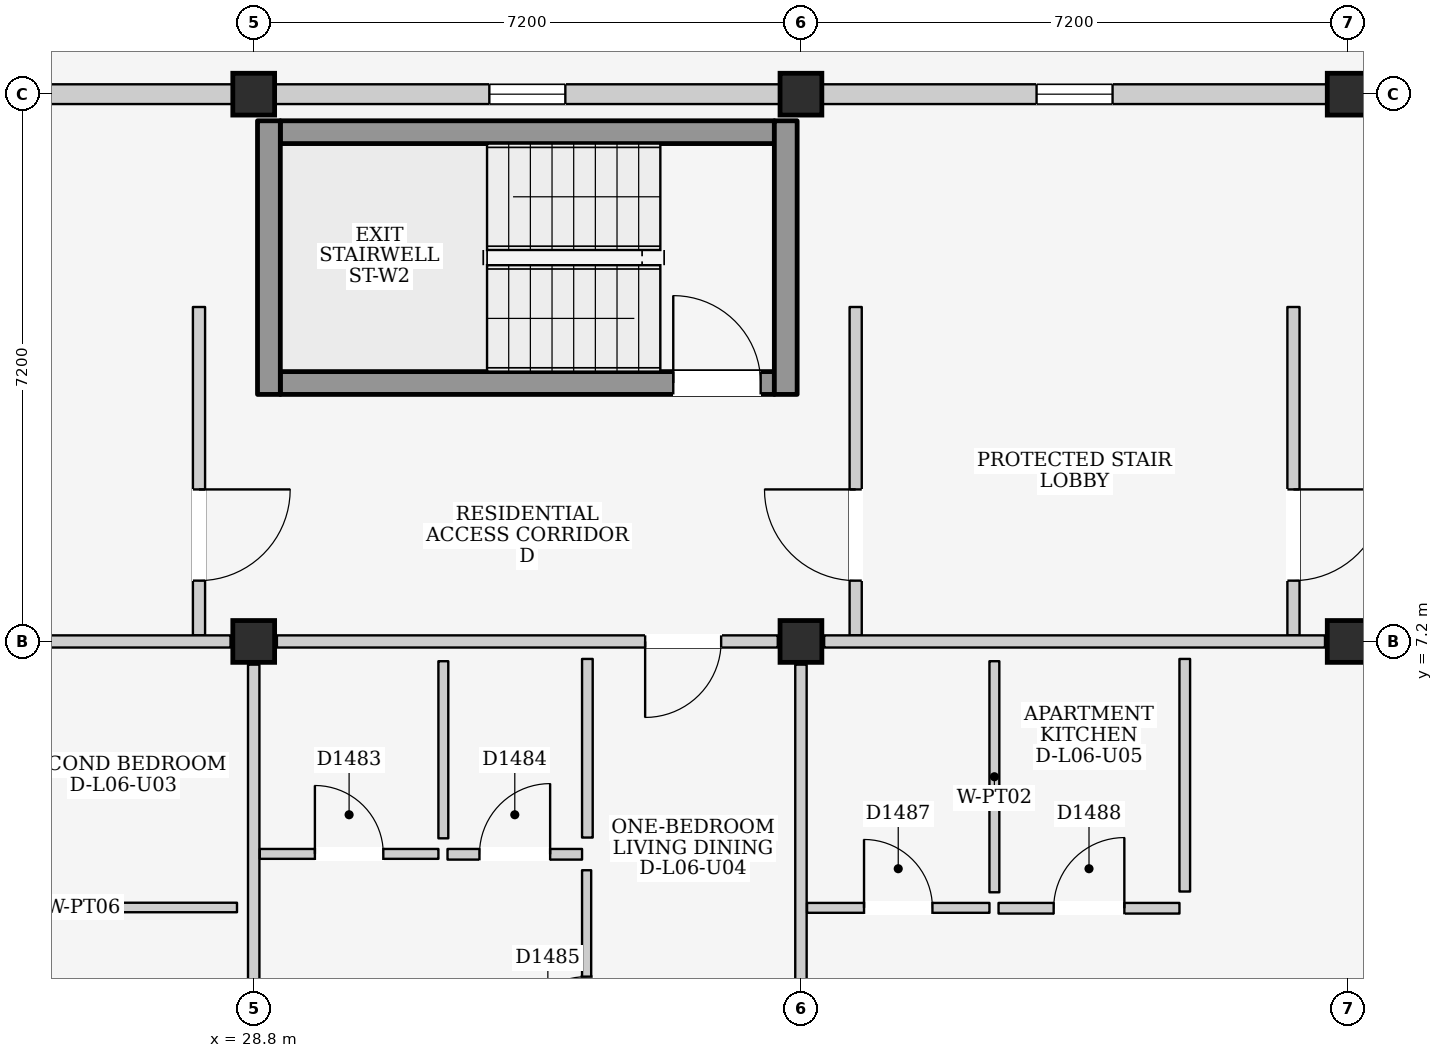
"""IFC4 building model, lengths in metres.
Left out: names, types, materials, properties, quantities, classifications, styles, units other than length and angle.
Written with IfcOpenShell. Run it as: python <this file> out.ifc"""

import sys

from ifc_helpers import new_model, si_unit, direction, frame, frame_2d, origin, origin_2d, place, context, subcontext, project, spatial, rectangle, extrude, element, fill, save


model = new_model("IFC4")
c1 = context("Model", 3, precision=1e-05, world=origin(), true_north=direction((0.0, 1.0)))
c2 = subcontext(c1, "Body", "Model", "MODEL_VIEW")
j1 = project(units=[si_unit("LENGTHUNIT", "METRE"), si_unit("PLANEANGLEUNIT", "RADIAN")], contexts=[c1])
p1 = place(None, origin())
s1 = spatial("IfcSite", under=j1, at=p1, CompositionType="ELEMENT")
p2 = place(p1, origin())
s2 = spatial("IfcBuilding", under=s1, at=p2, CompositionType="ELEMENT")
p3 = place(p2, frame((0.0, 0.0, 21.9)))
s3 = spatial("IfcBuildingStorey", under=s2, at=p3, CompositionType="ELEMENT", Elevation=21.9)
for number, where, z_axis, x_axis in (
    (1, (28.8, 7.2, 0.0), (0.0, 0.0, 1.0), (1.0, 0.0, 0.0)),
    (2, (28.8, 14.4, 0.0), (0.0, 0.0, 1.0), (1.0, 0.0, 0.0)),
    (3, (36.0, 7.2, 0.0), (0.0, 0.0, 1.0), (1.0, 0.0, 0.0)),
    (4, (36.0, 14.4, 0.0), (0.0, 0.0, 1.0), (1.0, 0.0, 0.0)),
    (5, (43.2, 7.2, 0.0), (0.0, 0.0, 1.0), (1.0, 0.0, 0.0)),
    (6, (43.2, 14.4, 0.0), (0.0, 0.0, 1.0), (1.0, 0.0, 0.0)),
):
    element("IfcColumn", number, at=place(p3, frame(where, z_axis=z_axis, x_axis=x_axis)), inside=s3, PredefinedType="COLUMN", context=c2, shape_type="SweptSolid", body=[
        extrude(rectangle(XDim=0.55, YDim=0.55, at=origin_2d()), origin(), (0.0, 0.0, 1.0), 3.2),
    ])
p4 = place(p3, frame((21.875, 14.4, 0.0), z_axis=(0.0, 0.0, 1.0), x_axis=(1.0, 0.0, 0.0)))
e7 = element("IfcWall", 7, at=p4, inside=s3, PredefinedType="ELEMENTEDWALL", context=c2, shape_type="SweptSolid", body=[
    extrude(rectangle(XDim=6.65, YDim=0.26, at=frame_2d((3.325, 0.0))), origin(), (0.0, 0.0, 1.0), 2.365),
])
p5 = place(p4, frame((2.825, 0.0, 1.2)))
e8 = element("IfcOpeningElement", 8, at=p5, cuts=e7, PredefinedType="OPENING", context=c2, shape_type="SweptSolid", body=[
    extrude(rectangle(XDim=1.0, YDim=0.9, at=frame_2d((0.5, 0.45))), frame((0.0, 0.145, 0.0), z_axis=(0.0, -1.0, 0.0), x_axis=(1.0, 0.0, 0.0)), (0.0, 0.0, 1.0), 0.29),
])
p6 = place(p3, frame((29.075, 14.4, 0.0), z_axis=(0.0, 0.0, 1.0), x_axis=(1.0, 0.0, 0.0)))
e9 = element("IfcWall", 9, at=p6, inside=s3, PredefinedType="ELEMENTEDWALL", context=c2, shape_type="SweptSolid", body=[
    extrude(rectangle(XDim=6.65, YDim=0.26, at=frame_2d((3.325, 0.0))), origin(), (0.0, 0.0, 1.0), 2.365),
])
p7 = place(p6, frame((2.825, 0.0, 1.2)))
e10 = element("IfcOpeningElement", 10, at=p7, cuts=e9, PredefinedType="OPENING", context=c2, shape_type="SweptSolid", body=[
    extrude(rectangle(XDim=1.0, YDim=0.9, at=frame_2d((0.5, 0.45))), frame((0.0, 0.145, 0.0), z_axis=(0.0, -1.0, 0.0), x_axis=(1.0, 0.0, 0.0)), (0.0, 0.0, 1.0), 0.29),
])
p8 = place(p3, frame((36.275, 14.4, 0.0), z_axis=(0.0, 0.0, 1.0), x_axis=(1.0, 0.0, 0.0)))
e11 = element("IfcWall", 11, at=p8, inside=s3, PredefinedType="ELEMENTEDWALL", context=c2, shape_type="SweptSolid", body=[
    extrude(rectangle(XDim=6.65, YDim=0.26, at=frame_2d((3.325, 0.0))), origin(), (0.0, 0.0, 1.0), 2.365),
])
p9 = place(p8, frame((2.825, 0.0, 1.2)))
e12 = element("IfcOpeningElement", 12, at=p9, cuts=e11, PredefinedType="OPENING", context=c2, shape_type="SweptSolid", body=[
    extrude(rectangle(XDim=1.0, YDim=0.9, at=frame_2d((0.5, 0.45))), frame((0.0, 0.145, 0.0), z_axis=(0.0, -1.0, 0.0), x_axis=(1.0, 0.0, 0.0)), (0.0, 0.0, 1.0), 0.29),
])
p10 = place(p3, frame((28.08, 7.28, 0.0), z_axis=(0.0, 0.0, 1.0), x_axis=(0.0, 1.0, 0.0)))
e13 = element("IfcWall", 13, at=p10, inside=s3, PredefinedType="PARTITIONING", context=c2, shape_type="SweptSolid", body=[
    extrude(rectangle(XDim=4.32, YDim=0.16, at=frame_2d((2.16, 0.0))), origin(), (0.0, 0.0, 1.0), 2.98),
])
p11 = place(p10, frame((0.72, 0.0, 0.0)))
e14 = element("IfcOpeningElement", 14, at=p11, cuts=e13, PredefinedType="OPENING", context=c2, shape_type="SweptSolid", body=[
    extrude(rectangle(XDim=1.2, YDim=2.2, at=frame_2d((0.6, 1.1))), frame((0.0, 0.095, 0.0), z_axis=(0.0, -1.0, 0.0), x_axis=(1.0, 0.0, 0.0)), (0.0, 0.0, 1.0), 0.19),
])
p12 = place(p3, frame((29.15, 10.6, 0.0), z_axis=(0.0, 0.0, 1.0), x_axis=(1.0, 0.0, 0.0)))
e15 = element("IfcWall", 15, at=p12, inside=s3, PredefinedType="SHEAR", context=c2, shape_type="SweptSolid", body=[
    extrude(rectangle(XDim=6.5, YDim=0.3, at=frame_2d((3.25, 0.0))), origin(), (0.0, 0.0, 1.0), 2.98),
])
p13 = place(p12, frame((5.17, 0.0, 0.0)))
e16 = element("IfcOpeningElement", 16, at=p13, cuts=e15, PredefinedType="OPENING", context=c2, shape_type="SweptSolid", body=[
    extrude(rectangle(XDim=1.15, YDim=2.2, at=frame_2d((0.575, 1.1))), frame((0.0, 0.165, 0.0), z_axis=(0.0, -1.0, 0.0), x_axis=(1.0, 0.0, 0.0)), (0.0, 0.0, 1.0), 0.33),
])
p14 = place(p3, frame((29.15, 13.9, 0.0), z_axis=(0.0, 0.0, 1.0), x_axis=(1.0, 0.0, 0.0)))
e17 = element("IfcWall", 17, at=p14, inside=s3, PredefinedType="SHEAR", context=c2, shape_type="SweptSolid", body=[
    extrude(rectangle(XDim=6.5, YDim=0.3, at=frame_2d((3.25, 0.0))), origin(), (0.0, 0.0, 1.0), 2.98),
])
for number, where, z_axis, x_axis in (
    (18, (29.0, 10.45, 0.0), (0.0, 0.0, 1.0), (0.0, 1.0, 0.0)),
    (19, (35.8, 10.45, 0.0), (0.0, 0.0, 1.0), (0.0, 1.0, 0.0)),
):
    element("IfcWall", number, at=place(p3, frame(where, z_axis=z_axis, x_axis=x_axis)), inside=s3, PredefinedType="SHEAR", context=c2, shape_type="SweptSolid", body=[
        extrude(rectangle(XDim=3.6, YDim=0.3, at=frame_2d((1.8, 0.0))), origin(), (0.0, 0.0, 1.0), 2.98),
    ])
p15 = place(p3, frame((36.72, 7.28, 0.0), z_axis=(0.0, 0.0, 1.0), x_axis=(0.0, 1.0, 0.0)))
e20 = element("IfcWall", 20, at=p15, inside=s3, PredefinedType="PARTITIONING", context=c2, shape_type="SweptSolid", body=[
    extrude(rectangle(XDim=4.32, YDim=0.16, at=frame_2d((2.16, 0.0))), origin(), (0.0, 0.0, 1.0), 2.98),
])
p16 = place(p15, frame((0.72, 0.0, 0.0)))
e21 = element("IfcOpeningElement", 21, at=p16, cuts=e20, PredefinedType="OPENING", context=c2, shape_type="SweptSolid", body=[
    extrude(rectangle(XDim=1.2, YDim=2.2, at=frame_2d((0.6, 1.1))), frame((0.0, 0.095, 0.0), z_axis=(0.0, -1.0, 0.0), x_axis=(1.0, 0.0, 0.0)), (0.0, 0.0, 1.0), 0.19),
])
p17 = place(p3, frame((42.48, 7.28, 0.0), z_axis=(0.0, 0.0, 1.0), x_axis=(0.0, 1.0, 0.0)))
e22 = element("IfcWall", 22, at=p17, inside=s3, PredefinedType="PARTITIONING", context=c2, shape_type="SweptSolid", body=[
    extrude(rectangle(XDim=4.32, YDim=0.16, at=frame_2d((2.16, 0.0))), origin(), (0.0, 0.0, 1.0), 2.98),
])
p18 = place(p17, frame((0.72, 0.0, 0.0)))
e23 = element("IfcOpeningElement", 23, at=p18, cuts=e22, PredefinedType="OPENING", context=c2, shape_type="SweptSolid", body=[
    extrude(rectangle(XDim=1.2, YDim=2.2, at=frame_2d((0.6, 1.1))), frame((0.0, 0.095, 0.0), z_axis=(0.0, -1.0, 0.0), x_axis=(1.0, 0.0, 0.0)), (0.0, 0.0, 1.0), 0.19),
])
p19 = place(p3, frame((21.905, 7.2, 0.0), z_axis=(0.0, 0.0, 1.0), x_axis=(1.0, 0.0, 0.0)))
e24 = element("IfcWall", 24, at=p19, inside=s3, PredefinedType="PARTITIONING", context=c2, shape_type="SweptSolid", body=[
    extrude(rectangle(XDim=6.59, YDim=0.16, at=frame_2d((3.295, 0.0))), origin(), (0.0, 0.0, 1.0), 2.365),
])
p20 = place(p3, frame((28.8, 0.305, 0.0), z_axis=(0.0, 0.0, 1.0), x_axis=(0.0, 1.0, 0.0)))
e25 = element("IfcWall", 25, at=p20, inside=s3, PredefinedType="PARTITIONING", context=c2, shape_type="SweptSolid", body=[
    extrude(rectangle(XDim=6.59, YDim=0.15, at=frame_2d((3.295, 0.0))), origin(), (0.0, 0.0, 1.0), 2.465),
])
p21 = place(p3, frame((24.52, 3.7, 0.0), z_axis=(0.0, 0.0, 1.0), x_axis=(1.0, 0.0, 0.0)))
e26 = element("IfcWall", 26, at=p21, inside=s3, PredefinedType="PARTITIONING", context=c2, shape_type="SweptSolid", body=[
    extrude(rectangle(XDim=4.06, YDim=0.125, at=frame_2d((2.03, 0.0))), origin(), (0.0, 0.0, 1.0), 2.98),
])
p22 = place(p3, frame((29.105, 7.2, 0.0), z_axis=(0.0, 0.0, 1.0), x_axis=(1.0, 0.0, 0.0)))
e27 = element("IfcWall", 27, at=p22, inside=s3, PredefinedType="PARTITIONING", context=c2, shape_type="SweptSolid", body=[
    extrude(rectangle(XDim=6.59, YDim=0.16, at=frame_2d((3.295, 0.0))), origin(), (0.0, 0.0, 1.0), 2.365),
])
p23 = place(p22, frame((4.845, 0.0, 0.0)))
e28 = element("IfcOpeningElement", 28, at=p23, cuts=e27, PredefinedType="OPENING", context=c2, shape_type="SweptSolid", body=[
    extrude(rectangle(XDim=1.0, YDim=2.15, at=frame_2d((0.5, 1.075))), frame((0.0, 0.095, 0.0), z_axis=(0.0, -1.0, 0.0), x_axis=(1.0, 0.0, 0.0)), (0.0, 0.0, 1.0), 0.19),
])
p24 = place(p3, frame((36.0, 0.305, 0.0), z_axis=(0.0, 0.0, 1.0), x_axis=(0.0, 1.0, 0.0)))
e29 = element("IfcWall", 29, at=p24, inside=s3, PredefinedType="PARTITIONING", context=c2, shape_type="SweptSolid", body=[
    extrude(rectangle(XDim=6.59, YDim=0.15, at=frame_2d((3.295, 0.0))), origin(), (0.0, 0.0, 1.0), 2.465),
])
p25 = place(p3, frame((28.88, 4.405, 0.0), z_axis=(0.0, 0.0, 1.0), x_axis=(1.0, 0.0, 0.0)))
e30 = element("IfcWall", 30, at=p25, inside=s3, PredefinedType="PARTITIONING", context=c2, shape_type="SweptSolid", body=[
    extrude(rectangle(XDim=2.35, YDim=0.13, at=frame_2d((1.175, 0.0))), origin(), (0.0, 0.0, 1.0), 2.98),
])
p26 = place(p25, frame((0.725, 0.0, 0.0)))
e31 = element("IfcOpeningElement", 31, at=p26, cuts=e30, PredefinedType="OPENING", context=c2, shape_type="SweptSolid", body=[
    extrude(rectangle(XDim=0.9, YDim=2.1, at=frame_2d((0.45, 1.05))), frame((0.0, 0.08, 0.0), z_axis=(0.0, -1.0, 0.0), x_axis=(1.0, 0.0, 0.0)), (0.0, 0.0, 1.0), 0.16),
])
p27 = place(p3, frame((31.295, 4.61, 0.0), z_axis=(0.0, 0.0, 1.0), x_axis=(0.0, 1.0, 0.0)))
e32 = element("IfcWall", 32, at=p27, inside=s3, PredefinedType="PARTITIONING", context=c2, shape_type="SweptSolid", body=[
    extrude(rectangle(XDim=2.33, YDim=0.13, at=frame_2d((1.165, 0.0))), origin(), (0.0, 0.0, 1.0), 2.98),
])
p28 = place(p3, frame((31.35, 4.4, 0.0), z_axis=(0.0, 0.0, 1.0), x_axis=(1.0, 0.0, 0.0)))
e33 = element("IfcWall", 33, at=p28, inside=s3, PredefinedType="PARTITIONING", context=c2, shape_type="SweptSolid", body=[
    extrude(rectangle(XDim=1.77, YDim=0.14, at=frame_2d((0.885, 0.0))), origin(), (0.0, 0.0, 1.0), 2.98),
])
p29 = place(p28, frame((0.42, 0.0, 0.0)))
e34 = element("IfcOpeningElement", 34, at=p29, cuts=e33, PredefinedType="OPENING", context=c2, shape_type="SweptSolid", body=[
    extrude(rectangle(XDim=0.93, YDim=2.14, at=frame_2d((0.465, 1.07))), frame((0.0, 0.085, 0.0), z_axis=(0.0, -1.0, 0.0), x_axis=(1.0, 0.0, 0.0)), (0.0, 0.0, 1.0), 0.17),
])
p30 = place(p3, frame((33.19, 4.62, 0.0), z_axis=(0.0, 0.0, 1.0), x_axis=(0.0, 1.0, 0.0)))
e35 = element("IfcWall", 35, at=p30, inside=s3, PredefinedType="PARTITIONING", context=c2, shape_type="SweptSolid", body=[
    extrude(rectangle(XDim=2.35, YDim=0.14, at=frame_2d((1.175, 0.0))), origin(), (0.0, 0.0, 1.0), 2.98),
])
p31 = place(p3, frame((33.18, 0.44, 0.0), z_axis=(0.0, 0.0, 1.0), x_axis=(0.0, 1.0, 0.0)))
e36 = element("IfcWall", 36, at=p31, inside=s3, PredefinedType="PARTITIONING", context=c2, shape_type="SweptSolid", body=[
    extrude(rectangle(XDim=3.75, YDim=0.12, at=frame_2d((1.875, 0.0))), origin(), (0.0, 0.0, 1.0), 2.98),
])
p32 = place(p31, frame((1.4, 0.0, 0.0)))
e37 = element("IfcOpeningElement", 37, at=p32, cuts=e36, PredefinedType="OPENING", context=c2, shape_type="SweptSolid", body=[
    extrude(rectangle(XDim=0.95, YDim=2.15, at=frame_2d((0.475, 1.075))), frame((0.0, 0.075, 0.0), z_axis=(0.0, -1.0, 0.0), x_axis=(1.0, 0.0, 0.0)), (0.0, 0.0, 1.0), 0.15),
])
p33 = place(p3, frame((36.305, 7.2, 0.0), z_axis=(0.0, 0.0, 1.0), x_axis=(1.0, 0.0, 0.0)))
e38 = element("IfcWall", 38, at=p33, inside=s3, PredefinedType="PARTITIONING", context=c2, shape_type="SweptSolid", body=[
    extrude(rectangle(XDim=6.59, YDim=0.16, at=frame_2d((3.295, 0.0))), origin(), (0.0, 0.0, 1.0), 2.365),
])
p34 = place(p3, frame((36.08, 3.695, 0.0), z_axis=(0.0, 0.0, 1.0), x_axis=(1.0, 0.0, 0.0)))
e39 = element("IfcWall", 39, at=p34, inside=s3, PredefinedType="PARTITIONING", context=c2, shape_type="SweptSolid", body=[
    extrude(rectangle(XDim=2.4, YDim=0.13, at=frame_2d((1.2, 0.0))), origin(), (0.0, 0.0, 1.0), 2.98),
])
p35 = place(p34, frame((0.75, 0.0, 0.0)))
e40 = element("IfcOpeningElement", 40, at=p35, cuts=e39, PredefinedType="OPENING", context=c2, shape_type="SweptSolid", body=[
    extrude(rectangle(XDim=0.9, YDim=2.1, at=frame_2d((0.45, 1.05))), frame((0.0, 0.08, 0.0), z_axis=(0.0, -1.0, 0.0), x_axis=(1.0, 0.0, 0.0)), (0.0, 0.0, 1.0), 0.16),
])
p36 = place(p3, frame((38.545, 3.9, 0.0), z_axis=(0.0, 0.0, 1.0), x_axis=(0.0, 1.0, 0.0)))
e41 = element("IfcWall", 41, at=p36, inside=s3, PredefinedType="PARTITIONING", context=c2, shape_type="SweptSolid", body=[
    extrude(rectangle(XDim=3.04, YDim=0.13, at=frame_2d((1.52, 0.0))), origin(), (0.0, 0.0, 1.0), 2.98),
])
p37 = place(p3, frame((38.6, 3.69, 0.0), z_axis=(0.0, 0.0, 1.0), x_axis=(1.0, 0.0, 0.0)))
e42 = element("IfcWall", 42, at=p37, inside=s3, PredefinedType="PARTITIONING", context=c2, shape_type="SweptSolid", body=[
    extrude(rectangle(XDim=2.38, YDim=0.14, at=frame_2d((1.19, 0.0))), origin(), (0.0, 0.0, 1.0), 2.98),
])
p38 = place(p37, frame((0.725, 0.0, 0.0)))
e43 = element("IfcOpeningElement", 43, at=p38, cuts=e42, PredefinedType="OPENING", context=c2, shape_type="SweptSolid", body=[
    extrude(rectangle(XDim=0.93, YDim=2.14, at=frame_2d((0.465, 1.07))), frame((0.0, 0.085, 0.0), z_axis=(0.0, -1.0, 0.0), x_axis=(1.0, 0.0, 0.0)), (0.0, 0.0, 1.0), 0.17),
])
p39 = place(p3, frame((41.05, 3.91, 0.0), z_axis=(0.0, 0.0, 1.0), x_axis=(0.0, 1.0, 0.0)))
e44 = element("IfcWall", 44, at=p39, inside=s3, PredefinedType="PARTITIONING", context=c2, shape_type="SweptSolid", body=[
    extrude(rectangle(XDim=3.06, YDim=0.14, at=frame_2d((1.53, 0.0))), origin(), (0.0, 0.0, 1.0), 2.98),
])
p40 = place(p7, origin())
e45 = element("IfcWindow", 45, at=p40, inside=s3, PartitioningType="SINGLE_PANEL", PredefinedType="WINDOW", context=c2, shape_type="SweptSolid", body=[
    extrude(rectangle(XDim=1.0, YDim=0.9, at=frame_2d((0.5, 0.45))), frame((0.0, 0.03, 0.0), z_axis=(0.0, -1.0, 0.0), x_axis=(1.0, 0.0, 0.0)), (0.0, 0.0, 1.0), 0.06),
])
fill(e10, e45)
p41 = place(p9, origin())
e46 = element("IfcWindow", 46, at=p41, inside=s3, PartitioningType="SINGLE_PANEL", PredefinedType="WINDOW", context=c2, shape_type="SweptSolid", body=[
    extrude(rectangle(XDim=1.0, YDim=0.9, at=frame_2d((0.5, 0.45))), frame((0.0, 0.03, 0.0), z_axis=(0.0, -1.0, 0.0), x_axis=(1.0, 0.0, 0.0)), (0.0, 0.0, 1.0), 0.06),
])
fill(e12, e46)
p42 = place(p11, frame((1.2, 0.0, 0.0), z_axis=(0.0, 0.0, 1.0), x_axis=(-1.0, 0.0, 0.0)))
e47 = element("IfcDoor", 47, at=p42, inside=s3, OperationType="SINGLE_SWING_LEFT", PredefinedType="DOOR", context=c2, shape_type="SweptSolid", body=[
    extrude(rectangle(XDim=1.2, YDim=2.2, at=frame_2d((0.6, 1.1))), frame((0.0, 0.025, 0.0), z_axis=(0.0, -1.0, 0.0), x_axis=(1.0, 0.0, 0.0)), (0.0, 0.0, 1.0), 0.05),
])
fill(e14, e47)
p43 = place(p13, origin())
e48 = element("IfcDoor", 48, at=p43, inside=s3, OperationType="SINGLE_SWING_LEFT", PredefinedType="DOOR", context=c2, shape_type="SweptSolid", body=[
    extrude(rectangle(XDim=1.15, YDim=2.2, at=frame_2d((0.575, 1.1))), frame((0.0, 0.025, 0.0), z_axis=(0.0, -1.0, 0.0), x_axis=(1.0, 0.0, 0.0)), (0.0, 0.0, 1.0), 0.05),
])
fill(e16, e48)
p44 = place(p16, origin())
e49 = element("IfcDoor", 49, at=p44, inside=s3, OperationType="SINGLE_SWING_RIGHT", PredefinedType="DOOR", context=c2, shape_type="SweptSolid", body=[
    extrude(rectangle(XDim=1.2, YDim=2.2, at=frame_2d((0.6, 1.1))), frame((0.0, 0.025, 0.0), z_axis=(0.0, -1.0, 0.0), x_axis=(1.0, 0.0, 0.0)), (0.0, 0.0, 1.0), 0.05),
])
fill(e21, e49)
p45 = place(p18, frame((1.2, 0.0, 0.0), z_axis=(0.0, 0.0, 1.0), x_axis=(-1.0, 0.0, 0.0)))
e50 = element("IfcDoor", 50, at=p45, inside=s3, OperationType="SINGLE_SWING_LEFT", PredefinedType="DOOR", context=c2, shape_type="SweptSolid", body=[
    extrude(rectangle(XDim=1.2, YDim=2.2, at=frame_2d((0.6, 1.1))), frame((0.0, 0.025, 0.0), z_axis=(0.0, -1.0, 0.0), x_axis=(1.0, 0.0, 0.0)), (0.0, 0.0, 1.0), 0.05),
])
fill(e23, e50)
p46 = place(p23, frame((1.0, 0.0, 0.0), z_axis=(0.0, 0.0, 1.0), x_axis=(-1.0, 0.0, 0.0)))
e51 = element("IfcDoor", 51, at=p46, inside=s3, OperationType="SINGLE_SWING_RIGHT", PredefinedType="DOOR", context=c2, shape_type="SweptSolid", body=[
    extrude(rectangle(XDim=1.0, YDim=2.15, at=frame_2d((0.5, 1.075))), frame((0.0, 0.025, 0.0), z_axis=(0.0, -1.0, 0.0), x_axis=(1.0, 0.0, 0.0)), (0.0, 0.0, 1.0), 0.05),
])
fill(e28, e51)
p47 = place(p26, origin())
e52 = element("IfcDoor", 52, at=p47, inside=s3, OperationType="SINGLE_SWING_LEFT", PredefinedType="DOOR", context=c2, shape_type="SweptSolid", body=[
    extrude(rectangle(XDim=0.9, YDim=2.1, at=frame_2d((0.45, 1.05))), frame((0.0, 0.025, 0.0), z_axis=(0.0, -1.0, 0.0), x_axis=(1.0, 0.0, 0.0)), (0.0, 0.0, 1.0), 0.05),
])
fill(e31, e52)
p48 = place(p29, origin())
e53 = element("IfcDoor", 53, at=p48, inside=s3, OperationType="SINGLE_SWING_RIGHT", PredefinedType="DOOR", context=c2, shape_type="SweptSolid", body=[
    extrude(rectangle(XDim=0.93, YDim=2.14, at=frame_2d((0.465, 1.07))), frame((0.0, 0.025, 0.0), z_axis=(0.0, -1.0, 0.0), x_axis=(1.0, 0.0, 0.0)), (0.0, 0.0, 1.0), 0.05),
])
fill(e34, e53)
p49 = place(p32, origin())
e54 = element("IfcDoor", 54, at=p49, inside=s3, OperationType="SINGLE_SWING_LEFT", PredefinedType="DOOR", context=c2, shape_type="SweptSolid", body=[
    extrude(rectangle(XDim=0.95, YDim=2.15, at=frame_2d((0.475, 1.075))), frame((0.0, 0.025, 0.0), z_axis=(0.0, -1.0, 0.0), x_axis=(1.0, 0.0, 0.0)), (0.0, 0.0, 1.0), 0.05),
])
fill(e37, e54)
p50 = place(p35, origin())
e55 = element("IfcDoor", 55, at=p50, inside=s3, OperationType="SINGLE_SWING_LEFT", PredefinedType="DOOR", context=c2, shape_type="SweptSolid", body=[
    extrude(rectangle(XDim=0.9, YDim=2.1, at=frame_2d((0.45, 1.05))), frame((0.0, 0.025, 0.0), z_axis=(0.0, -1.0, 0.0), x_axis=(1.0, 0.0, 0.0)), (0.0, 0.0, 1.0), 0.05),
])
fill(e40, e55)
p51 = place(p38, origin())
e56 = element("IfcDoor", 56, at=p51, inside=s3, OperationType="SINGLE_SWING_RIGHT", PredefinedType="DOOR", context=c2, shape_type="SweptSolid", body=[
    extrude(rectangle(XDim=0.93, YDim=2.14, at=frame_2d((0.465, 1.07))), frame((0.0, 0.025, 0.0), z_axis=(0.0, -1.0, 0.0), x_axis=(1.0, 0.0, 0.0)), (0.0, 0.0, 1.0), 0.05),
])
fill(e43, e56)
save(model, sys.argv[1])
